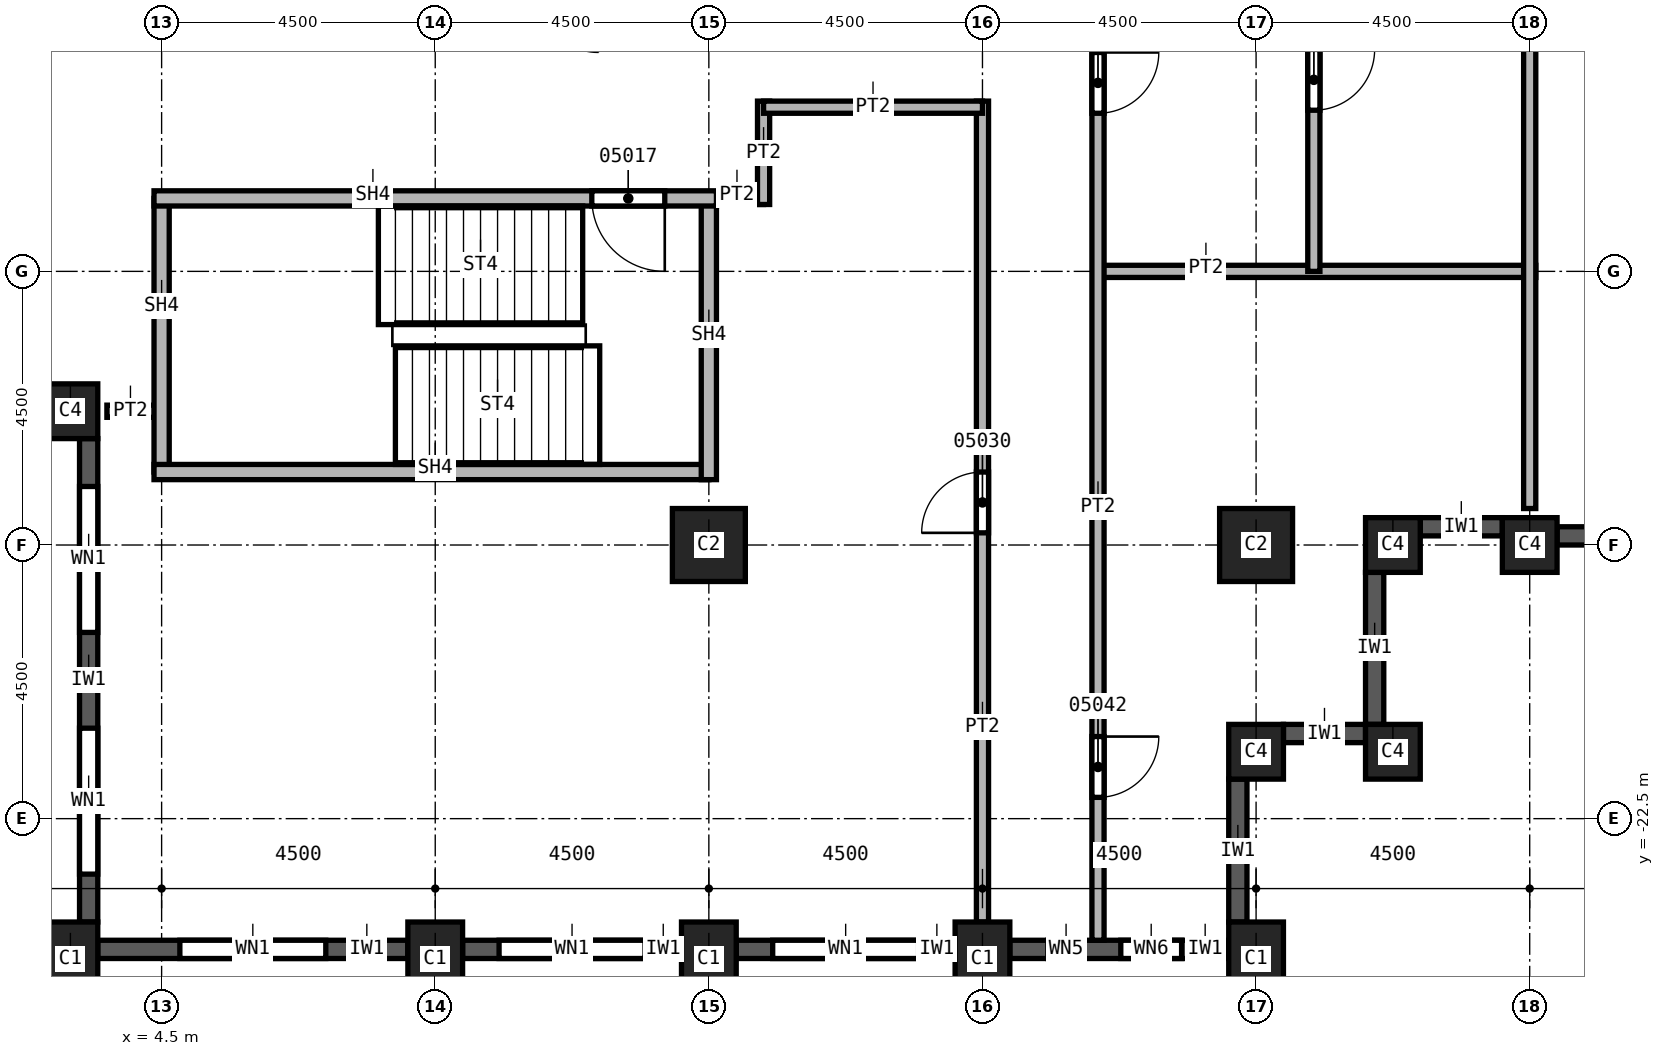
"""IFC4 building model, lengths in metres.
Left out: names, types, materials, properties, quantities, classifications, styles, units other than length and angle.
Written with IfcOpenShell. Run it as: python <this file> out.ifc"""

import sys

from ifc_helpers import new_model, si_unit, direction, frame, frame_2d, origin, origin_2d, place, context, subcontext, project, spatial, rectangle, extrude, element, fill, save


model = new_model("IFC4")
c1 = context("Model", 3, precision=1e-05, world=origin(), true_north=direction((0.0, 1.0)))
c2 = subcontext(c1, "Body", "Model", "MODEL_VIEW")
j1 = project(units=[si_unit("LENGTHUNIT", "METRE"), si_unit("PLANEANGLEUNIT", "RADIAN")], contexts=[c1])
p1 = place(None, origin())
s1 = spatial("IfcSite", under=j1, at=p1, CompositionType="ELEMENT")
p2 = place(p1, origin())
s2 = spatial("IfcBuilding", under=s1, at=p2, CompositionType="ELEMENT")
p3 = place(p2, frame((0.0, 0.0, 116.0)))
s3 = spatial("IfcBuildingStorey", under=s2, at=p3, CompositionType="ELEMENT", Elevation=116.0)
for number, where, z_axis, x_axis in (
    (1, (13.5, -18.0, 0.0), (0.0, 0.0, 1.0), (1.0, 0.0, 0.0)),
    (2, (22.5, -18.0, 0.0), (0.0, 0.0, 1.0), (1.0, 0.0, 0.0)),
):
    element("IfcColumn", number, at=place(p3, frame(where, z_axis=z_axis, x_axis=x_axis)), inside=s3, PredefinedType="COLUMN", context=c2, shape_type="SweptSolid", body=[
        extrude(rectangle(XDim=1.2, YDim=1.2, at=origin_2d()), origin(), (0.0, 0.0, 1.0), 3.6),
    ])
p4 = place(p3, frame((27.0, -18.0, 0.0), z_axis=(0.0, 0.0, 1.0), x_axis=(1.0, 0.0, 0.0)))
e3 = element("IfcColumn", 3, at=p4, inside=s3, PredefinedType="COLUMN", context=c2, shape_type="SweptSolid", body=[
    extrude(rectangle(XDim=0.9, YDim=0.9, at=origin_2d()), origin(), (0.0, 0.0, 1.0), 3.6),
])
for number, where, z_axis, x_axis in (
    (4, (3.0, -24.8, 0.0), (0.0, 0.0, 1.0), (1.0, 0.0, 0.0)),
    (5, (9.0, -24.8, 0.0), (0.0, 0.0, 1.0), (1.0, 0.0, 0.0)),
    (6, (13.5, -24.8, 0.0), (0.0, 0.0, 1.0), (1.0, 0.0, 0.0)),
    (7, (18.0, -24.8, 0.0), (0.0, 0.0, 1.0), (1.0, 0.0, 0.0)),
    (8, (22.5, -24.8, 0.0), (0.0, 0.0, 1.0), (1.0, 0.0, 0.0)),
):
    element("IfcColumn", number, at=place(p3, frame(where, z_axis=z_axis, x_axis=x_axis)), inside=s3, PredefinedType="COLUMN", context=c2, shape_type="SweptSolid", body=[
        extrude(rectangle(XDim=0.9, YDim=1.2, at=origin_2d()), origin(), (0.0, 0.0, 1.0), 3.6),
    ])
for number, where, z_axis, x_axis in (
    (9, (3.0, -15.8, 0.0), (0.0, 0.0, 1.0), (1.0, 0.0, 0.0)),
    (10, (22.5, -21.4, 0.0), (0.0, 0.0, 1.0), (1.0, 0.0, 0.0)),
    (11, (24.75, -21.4, 0.0), (0.0, 0.0, 1.0), (1.0, 0.0, 0.0)),
    (12, (24.75, -18.0, 0.0), (0.0, 0.0, 1.0), (1.0, 0.0, 0.0)),
):
    element("IfcColumn", number, at=place(p3, frame(where, z_axis=z_axis, x_axis=x_axis)), inside=s3, PredefinedType="COLUMN", context=c2, shape_type="SweptSolid", body=[
        extrude(rectangle(XDim=0.9, YDim=0.9, at=origin_2d()), origin(), (0.0, 0.0, 1.0), 3.6),
    ])
p5 = place(p3, frame((3.3, -16.25, 0.0), z_axis=(0.0, 0.0, 1.0), x_axis=(0.0, -1.0, 0.0)))
e13 = element("IfcWall", 13, at=p5, inside=s3, PredefinedType="SOLIDWALL", context=c2, shape_type="SweptSolid", body=[
    extrude(rectangle(XDim=7.95, YDim=0.3, at=frame_2d((3.975, 0.0))), origin(), (0.0, 0.0, 1.0), 3.0),
])
p6 = place(p5, frame((0.788, 0.0, 0.8)))
e14 = element("IfcOpeningElement", 14, at=p6, cuts=e13, PredefinedType="OPENING", context=c2, shape_type="SweptSolid", body=[
    extrude(rectangle(XDim=2.4, YDim=1.95, at=frame_2d((1.2, 0.975))), frame((0.0, 0.15, 0.0), z_axis=(0.0, -1.0, 0.0), x_axis=(1.0, 0.0, 0.0)), (0.0, 0.0, 1.0), 0.3),
])
p7 = place(p5, frame((4.762, 0.0, 0.8)))
e15 = element("IfcOpeningElement", 15, at=p7, cuts=e13, PredefinedType="OPENING", context=c2, shape_type="SweptSolid", body=[
    extrude(rectangle(XDim=2.4, YDim=1.95, at=frame_2d((1.2, 0.975))), frame((0.0, 0.15, 0.0), z_axis=(0.0, -1.0, 0.0), x_axis=(1.0, 0.0, 0.0)), (0.0, 0.0, 1.0), 0.3),
])
p8 = place(p3, frame((3.45, -24.65, 0.0), z_axis=(0.0, 0.0, 1.0), x_axis=(1.0, 0.0, 0.0)))
e16 = element("IfcWall", 16, at=p8, inside=s3, PredefinedType="SOLIDWALL", context=c2, shape_type="SweptSolid", body=[
    extrude(rectangle(XDim=5.1, YDim=0.3, at=frame_2d((2.55, 0.0))), origin(), (0.0, 0.0, 1.0), 3.0),
])
p9 = place(p8, frame((1.35, 0.0, 0.8)))
e17 = element("IfcOpeningElement", 17, at=p9, cuts=e16, PredefinedType="OPENING", context=c2, shape_type="SweptSolid", body=[
    extrude(rectangle(XDim=2.4, YDim=1.95, at=frame_2d((1.2, 0.975))), frame((0.0, 0.15, 0.0), z_axis=(0.0, -1.0, 0.0), x_axis=(1.0, 0.0, 0.0)), (0.0, 0.0, 1.0), 0.3),
])
p10 = place(p3, frame((9.45, -24.65, 0.0), z_axis=(0.0, 0.0, 1.0), x_axis=(1.0, 0.0, 0.0)))
e18 = element("IfcWall", 18, at=p10, inside=s3, PredefinedType="SOLIDWALL", context=c2, shape_type="SweptSolid", body=[
    extrude(rectangle(XDim=3.6, YDim=0.3, at=frame_2d((1.8, 0.0))), origin(), (0.0, 0.0, 1.0), 3.0),
])
p11 = place(p10, frame((0.6, 0.0, 0.8)))
e19 = element("IfcOpeningElement", 19, at=p11, cuts=e18, PredefinedType="OPENING", context=c2, shape_type="SweptSolid", body=[
    extrude(rectangle(XDim=2.4, YDim=1.95, at=frame_2d((1.2, 0.975))), frame((0.0, 0.15, 0.0), z_axis=(0.0, -1.0, 0.0), x_axis=(1.0, 0.0, 0.0)), (0.0, 0.0, 1.0), 0.3),
])
p12 = place(p3, frame((13.95, -24.65, 0.0), z_axis=(0.0, 0.0, 1.0), x_axis=(1.0, 0.0, 0.0)))
e20 = element("IfcWall", 20, at=p12, inside=s3, PredefinedType="SOLIDWALL", context=c2, shape_type="SweptSolid", body=[
    extrude(rectangle(XDim=3.6, YDim=0.3, at=frame_2d((1.8, 0.0))), origin(), (0.0, 0.0, 1.0), 3.0),
])
p13 = place(p12, frame((0.6, 0.0, 0.8)))
e21 = element("IfcOpeningElement", 21, at=p13, cuts=e20, PredefinedType="OPENING", context=c2, shape_type="SweptSolid", body=[
    extrude(rectangle(XDim=2.4, YDim=1.95, at=frame_2d((1.2, 0.975))), frame((0.0, 0.15, 0.0), z_axis=(0.0, -1.0, 0.0), x_axis=(1.0, 0.0, 0.0)), (0.0, 0.0, 1.0), 0.3),
])
p14 = place(p3, frame((18.45, -24.65, 0.0), z_axis=(0.0, 0.0, 1.0), x_axis=(1.0, 0.0, 0.0)))
e22 = element("IfcWall", 22, at=p14, inside=s3, PredefinedType="SOLIDWALL", context=c2, shape_type="SweptSolid", body=[
    extrude(rectangle(XDim=3.6, YDim=0.3, at=frame_2d((1.8, 0.0))), origin(), (0.0, 0.0, 1.0), 3.0),
])
p15 = place(p14, frame((0.625, 0.0, 0.8)))
e23 = element("IfcOpeningElement", 23, at=p15, cuts=e22, PredefinedType="OPENING", context=c2, shape_type="SweptSolid", body=[
    extrude(rectangle(XDim=0.6, YDim=1.95, at=frame_2d((0.3, 0.975))), frame((0.0, 0.15, 0.0), z_axis=(0.0, -1.0, 0.0), x_axis=(1.0, 0.0, 0.0)), (0.0, 0.0, 1.0), 0.3),
])
p16 = place(p14, frame((1.825, 0.0, 0.8)))
e24 = element("IfcOpeningElement", 24, at=p16, cuts=e22, PredefinedType="OPENING", context=c2, shape_type="SweptSolid", body=[
    extrude(rectangle(XDim=1.0, YDim=1.95, at=frame_2d((0.5, 0.975))), frame((0.0, 0.15, 0.0), z_axis=(0.0, -1.0, 0.0), x_axis=(1.0, 0.0, 0.0)), (0.0, 0.0, 1.0), 0.3),
])
p17 = place(p3, frame((22.2, -24.2, 0.0), z_axis=(0.0, 0.0, 1.0), x_axis=(0.0, 1.0, 0.0)))
e25 = element("IfcWall", 25, at=p17, inside=s3, PredefinedType="SOLIDWALL", context=c2, shape_type="SweptSolid", body=[
    extrude(rectangle(XDim=2.35, YDim=0.3, at=frame_2d((1.175, 0.0))), origin(), (0.0, 0.0, 1.0), 3.0),
])
p18 = place(p3, frame((22.95, -21.1, 0.0), z_axis=(0.0, 0.0, 1.0), x_axis=(1.0, 0.0, 0.0)))
e26 = element("IfcWall", 26, at=p18, inside=s3, PredefinedType="SOLIDWALL", context=c2, shape_type="SweptSolid", body=[
    extrude(rectangle(XDim=1.35, YDim=0.3, at=frame_2d((0.675, 0.0))), origin(), (0.0, 0.0, 1.0), 3.0),
])
p19 = place(p3, frame((24.45, -20.95, 0.0), z_axis=(0.0, 0.0, 1.0), x_axis=(0.0, 1.0, 0.0)))
e27 = element("IfcWall", 27, at=p19, inside=s3, PredefinedType="SOLIDWALL", context=c2, shape_type="SweptSolid", body=[
    extrude(rectangle(XDim=2.5, YDim=0.3, at=frame_2d((1.25, 0.0))), origin(), (0.0, 0.0, 1.0), 3.0),
])
p20 = place(p3, frame((25.2, -17.7, 0.0), z_axis=(0.0, 0.0, 1.0), x_axis=(1.0, 0.0, 0.0)))
e28 = element("IfcWall", 28, at=p20, inside=s3, PredefinedType="SOLIDWALL", context=c2, shape_type="SweptSolid", body=[
    extrude(rectangle(XDim=1.35, YDim=0.3, at=frame_2d((0.675, 0.0))), origin(), (0.0, 0.0, 1.0), 3.0),
])
p21 = place(p3, frame((27.45, -17.85, 0.0), z_axis=(0.0, 0.0, 1.0), x_axis=(1.0, 0.0, 0.0)))
e29 = element("IfcWall", 29, at=p21, inside=s3, PredefinedType="SOLIDWALL", context=c2, shape_type="SweptSolid", body=[
    extrude(rectangle(XDim=3.6, YDim=0.3, at=frame_2d((1.8, 0.0))), origin(), (0.0, 0.0, 1.0), 3.0),
])
p22 = place(p21, frame((0.6, 0.0, 0.8)))
e30 = element("IfcOpeningElement", 30, at=p22, cuts=e29, PredefinedType="OPENING", context=c2, shape_type="SweptSolid", body=[
    extrude(rectangle(XDim=2.4, YDim=1.95, at=frame_2d((1.2, 0.975))), frame((0.0, 0.15, 0.0), z_axis=(0.0, -1.0, 0.0), x_axis=(1.0, 0.0, 0.0)), (0.0, 0.0, 1.0), 0.3),
])
p23 = place(p3, frame((4.5, -15.8, 0.0), z_axis=(0.0, 0.0, 1.0), x_axis=(-1.0, 0.0, 0.0)))
e31 = element("IfcWall", 31, at=p23, inside=s3, PredefinedType="PARTITIONING", context=c2, shape_type="SweptSolid", body=[
    extrude(rectangle(XDim=0.9, YDim=0.2, at=frame_2d((0.45, 0.0))), origin(), (0.0, 0.0, 1.0), 3.6),
])
p24 = place(p3, frame((14.4, -12.3, 0.0), z_axis=(0.0, 0.0, 1.0), x_axis=(-1.0, 0.0, 0.0)))
e32 = element("IfcWall", 32, at=p24, inside=s3, PredefinedType="PARTITIONING", context=c2, shape_type="SweptSolid", body=[
    extrude(rectangle(XDim=1.025, YDim=0.2, at=frame_2d((0.512, 0.0))), origin(), (0.0, 0.0, 1.0), 3.6),
])
p25 = place(p3, frame((14.4, -10.7, 0.0), z_axis=(0.0, 0.0, 1.0), x_axis=(0.0, -1.0, 0.0)))
e33 = element("IfcWall", 33, at=p25, inside=s3, PredefinedType="PARTITIONING", context=c2, shape_type="SweptSolid", body=[
    extrude(rectangle(XDim=1.7, YDim=0.2, at=frame_2d((0.85, 0.0))), origin(), (0.0, 0.0, 1.0), 3.6),
])
p26 = place(p3, frame((18.0, -24.2, 0.0), z_axis=(0.0, 0.0, 1.0), x_axis=(0.0, 1.0, 0.0)))
e34 = element("IfcWall", 34, at=p26, inside=s3, PredefinedType="PARTITIONING", context=c2, shape_type="SweptSolid", body=[
    extrude(rectangle(XDim=13.5, YDim=0.2, at=frame_2d((6.75, 0.0))), origin(), (0.0, 0.0, 1.0), 3.6),
])
p27 = place(p26, frame((6.4, 0.0, 0.0)))
e35 = element("IfcOpeningElement", 35, at=p27, cuts=e34, PredefinedType="OPENING", context=c2, shape_type="SweptSolid", body=[
    extrude(rectangle(XDim=1.0, YDim=2.1, at=frame_2d((0.5, 1.05))), frame((0.0, 0.1, 0.0), z_axis=(0.0, -1.0, 0.0), x_axis=(1.0, 0.0, 0.0)), (0.0, 0.0, 1.0), 0.2),
])
p28 = place(p3, frame((18.0, -10.8, 0.0), z_axis=(0.0, 0.0, 1.0), x_axis=(-1.0, 0.0, 0.0)))
e36 = element("IfcWall", 36, at=p28, inside=s3, PredefinedType="PARTITIONING", context=c2, shape_type="SweptSolid", body=[
    extrude(rectangle(XDim=3.6, YDim=0.2, at=frame_2d((1.8, 0.0))), origin(), (0.0, 0.0, 1.0), 3.6),
])
p29 = place(p3, frame((19.9, -13.5, 0.0), z_axis=(0.0, 0.0, 1.0), x_axis=(1.0, 0.0, 0.0)))
e37 = element("IfcWall", 37, at=p29, inside=s3, PredefinedType="PARTITIONING", context=c2, shape_type="SweptSolid", body=[
    extrude(rectangle(XDim=7.2, YDim=0.2, at=frame_2d((3.6, 0.0))), origin(), (0.0, 0.0, 1.0), 3.6),
])
p30 = place(p3, frame((19.9, -3.65, 0.0), z_axis=(0.0, 0.0, 1.0), x_axis=(0.0, -1.0, 0.0)))
e38 = element("IfcWall", 38, at=p30, inside=s3, PredefinedType="PARTITIONING", context=c2, shape_type="SweptSolid", body=[
    extrude(rectangle(XDim=20.85, YDim=0.2, at=frame_2d((10.425, 0.0))), origin(), (0.0, 0.0, 1.0), 3.6),
])
p31 = place(p30, frame((17.5, 0.0, 0.0)))
e39 = element("IfcOpeningElement", 39, at=p31, cuts=e38, PredefinedType="OPENING", context=c2, shape_type="SweptSolid", body=[
    extrude(rectangle(XDim=1.0, YDim=2.1, at=frame_2d((0.5, 1.05))), frame((0.0, 0.1, 0.0), z_axis=(0.0, -1.0, 0.0), x_axis=(1.0, 0.0, 0.0)), (0.0, 0.0, 1.0), 0.2),
])
p32 = place(p30, frame((6.25, 0.0, 0.0)))
e40 = element("IfcOpeningElement", 40, at=p32, cuts=e38, PredefinedType="OPENING", context=c2, shape_type="SweptSolid", body=[
    extrude(rectangle(XDim=1.0, YDim=2.1, at=frame_2d((0.5, 1.05))), frame((0.0, 0.1, 0.0), z_axis=(0.0, -1.0, 0.0), x_axis=(1.0, 0.0, 0.0)), (0.0, 0.0, 1.0), 0.2),
])
p33 = place(p3, frame((23.45, -3.75, 0.0), z_axis=(0.0, 0.0, 1.0), x_axis=(0.0, -1.0, 0.0)))
e41 = element("IfcWall", 41, at=p33, inside=s3, PredefinedType="PARTITIONING", context=c2, shape_type="SweptSolid", body=[
    extrude(rectangle(XDim=9.75, YDim=0.2, at=frame_2d((4.875, 0.0))), origin(), (0.0, 0.0, 1.0), 3.6),
])
p34 = place(p33, frame((6.1, 0.0, 0.0)))
e42 = element("IfcOpeningElement", 42, at=p34, cuts=e41, PredefinedType="OPENING", context=c2, shape_type="SweptSolid", body=[
    extrude(rectangle(XDim=1.0, YDim=2.1, at=frame_2d((0.5, 1.05))), frame((0.0, 0.1, 0.0), z_axis=(0.0, -1.0, 0.0), x_axis=(1.0, 0.0, 0.0)), (0.0, 0.0, 1.0), 0.2),
])
p35 = place(p3, frame((27.0, -3.75, 0.0), z_axis=(0.0, 0.0, 1.0), x_axis=(0.0, -1.0, 0.0)))
e43 = element("IfcWall", 43, at=p35, inside=s3, PredefinedType="PARTITIONING", context=c2, shape_type="SweptSolid", body=[
    extrude(rectangle(XDim=13.65, YDim=0.2, at=frame_2d((6.825, 0.0))), origin(), (0.0, 0.0, 1.0), 3.6),
])
p36 = place(p3, frame((4.5, -16.8, 0.0), z_axis=(0.0, 0.0, 1.0), x_axis=(0.0, 1.0, 0.0)))
e44 = element("IfcWall", 44, at=p36, inside=s3, PredefinedType="SOLIDWALL", context=c2, shape_type="SweptSolid", body=[
    extrude(rectangle(XDim=4.5, YDim=0.25, at=frame_2d((2.25, 0.0))), origin(), (0.0, 0.0, 1.0), 3.6),
])
p37 = place(p3, frame((13.5, -16.8, 0.0), z_axis=(0.0, 0.0, 1.0), x_axis=(-1.0, 0.0, 0.0)))
e45 = element("IfcWall", 45, at=p37, inside=s3, PredefinedType="SOLIDWALL", context=c2, shape_type="SweptSolid", body=[
    extrude(rectangle(XDim=9.125, YDim=0.25, at=frame_2d((4.562, 0.0))), origin(), (0.0, 0.0, 1.0), 3.6),
])
p38 = place(p3, frame((13.5, -12.3, 0.0), z_axis=(0.0, 0.0, 1.0), x_axis=(0.0, -1.0, 0.0)))
e46 = element("IfcWall", 46, at=p38, inside=s3, PredefinedType="SOLIDWALL", context=c2, shape_type="SweptSolid", body=[
    extrude(rectangle(XDim=4.625, YDim=0.25, at=frame_2d((2.312, 0.0))), origin(), (0.0, 0.0, 1.0), 3.6),
])
p39 = place(p3, frame((13.625, -12.3, 0.0), z_axis=(0.0, 0.0, 1.0), x_axis=(-1.0, 0.0, 0.0)))
e47 = element("IfcWall", 47, at=p39, inside=s3, PredefinedType="SOLIDWALL", context=c2, shape_type="SweptSolid", body=[
    extrude(rectangle(XDim=9.25, YDim=0.25, at=frame_2d((4.625, 0.0))), origin(), (0.0, 0.0, 1.0), 3.6),
])
p40 = place(p39, frame((0.85, 0.0, 0.0)))
e48 = element("IfcOpeningElement", 48, at=p40, cuts=e47, PredefinedType="OPENING", context=c2, shape_type="SweptSolid", body=[
    extrude(rectangle(XDim=1.2, YDim=2.1, at=frame_2d((0.6, 1.05))), frame((0.0, 0.125, 0.0), z_axis=(0.0, -1.0, 0.0), x_axis=(1.0, 0.0, 0.0)), (0.0, 0.0, 1.0), 0.25),
])
p41 = place(p6, origin())
e49 = element("IfcWindow", 49, at=p41, inside=s3, PartitioningType="SINGLE_PANEL", PredefinedType="WINDOW", context=c2, shape_type="SweptSolid", body=[
    extrude(rectangle(XDim=2.4, YDim=1.95, at=frame_2d((1.2, 0.975))), frame((0.0, 0.03, 0.0), z_axis=(0.0, -1.0, 0.0), x_axis=(1.0, 0.0, 0.0)), (0.0, 0.0, 1.0), 0.06),
])
fill(e14, e49)
p42 = place(p7, origin())
e50 = element("IfcWindow", 50, at=p42, inside=s3, PartitioningType="SINGLE_PANEL", PredefinedType="WINDOW", context=c2, shape_type="SweptSolid", body=[
    extrude(rectangle(XDim=2.4, YDim=1.95, at=frame_2d((1.2, 0.975))), frame((0.0, 0.03, 0.0), z_axis=(0.0, -1.0, 0.0), x_axis=(1.0, 0.0, 0.0)), (0.0, 0.0, 1.0), 0.06),
])
fill(e15, e50)
p43 = place(p9, origin())
e51 = element("IfcWindow", 51, at=p43, inside=s3, PartitioningType="SINGLE_PANEL", PredefinedType="WINDOW", context=c2, shape_type="SweptSolid", body=[
    extrude(rectangle(XDim=2.4, YDim=1.95, at=frame_2d((1.2, 0.975))), frame((0.0, 0.03, 0.0), z_axis=(0.0, -1.0, 0.0), x_axis=(1.0, 0.0, 0.0)), (0.0, 0.0, 1.0), 0.06),
])
fill(e17, e51)
p44 = place(p11, origin())
e52 = element("IfcWindow", 52, at=p44, inside=s3, PartitioningType="SINGLE_PANEL", PredefinedType="WINDOW", context=c2, shape_type="SweptSolid", body=[
    extrude(rectangle(XDim=2.4, YDim=1.95, at=frame_2d((1.2, 0.975))), frame((0.0, 0.03, 0.0), z_axis=(0.0, -1.0, 0.0), x_axis=(1.0, 0.0, 0.0)), (0.0, 0.0, 1.0), 0.06),
])
fill(e19, e52)
p45 = place(p13, origin())
e53 = element("IfcWindow", 53, at=p45, inside=s3, PartitioningType="SINGLE_PANEL", PredefinedType="WINDOW", context=c2, shape_type="SweptSolid", body=[
    extrude(rectangle(XDim=2.4, YDim=1.95, at=frame_2d((1.2, 0.975))), frame((0.0, 0.03, 0.0), z_axis=(0.0, -1.0, 0.0), x_axis=(1.0, 0.0, 0.0)), (0.0, 0.0, 1.0), 0.06),
])
fill(e21, e53)
p46 = place(p40, origin())
e54 = element("IfcDoor", 54, at=p46, inside=s3, OperationType="SINGLE_SWING_RIGHT", PredefinedType="DOOR", context=c2, shape_type="SweptSolid", body=[
    extrude(rectangle(XDim=1.2, YDim=2.1, at=frame_2d((0.6, 1.05))), frame((0.0, 0.025, 0.0), z_axis=(0.0, -1.0, 0.0), x_axis=(1.0, 0.0, 0.0)), (0.0, 0.0, 1.0), 0.05),
])
fill(e48, e54)
p47 = place(p27, origin())
e55 = element("IfcDoor", 55, at=p47, inside=s3, OperationType="SINGLE_SWING_LEFT", PredefinedType="DOOR", context=c2, shape_type="SweptSolid", body=[
    extrude(rectangle(XDim=1.0, YDim=2.1, at=frame_2d((0.5, 1.05))), frame((0.0, 0.025, 0.0), z_axis=(0.0, -1.0, 0.0), x_axis=(1.0, 0.0, 0.0)), (0.0, 0.0, 1.0), 0.05),
])
fill(e35, e55)
p48 = place(p31, origin())
e56 = element("IfcDoor", 56, at=p48, inside=s3, OperationType="SINGLE_SWING_LEFT", PredefinedType="DOOR", context=c2, shape_type="SweptSolid", body=[
    extrude(rectangle(XDim=1.0, YDim=2.1, at=frame_2d((0.5, 1.05))), frame((0.0, 0.025, 0.0), z_axis=(0.0, -1.0, 0.0), x_axis=(1.0, 0.0, 0.0)), (0.0, 0.0, 1.0), 0.05),
])
fill(e39, e56)
p49 = place(p32, origin())
e57 = element("IfcDoor", 57, at=p49, inside=s3, OperationType="SINGLE_SWING_RIGHT", PredefinedType="DOOR", context=c2, shape_type="SweptSolid", body=[
    extrude(rectangle(XDim=1.0, YDim=2.1, at=frame_2d((0.5, 1.05))), frame((0.0, 0.025, 0.0), z_axis=(0.0, -1.0, 0.0), x_axis=(1.0, 0.0, 0.0)), (0.0, 0.0, 1.0), 0.05),
])
fill(e40, e57)
p50 = place(p34, origin())
e58 = element("IfcDoor", 58, at=p50, inside=s3, OperationType="SINGLE_SWING_LEFT", PredefinedType="DOOR", context=c2, shape_type="SweptSolid", body=[
    extrude(rectangle(XDim=1.0, YDim=2.1, at=frame_2d((0.5, 1.05))), frame((0.0, 0.025, 0.0), z_axis=(0.0, -1.0, 0.0), x_axis=(1.0, 0.0, 0.0)), (0.0, 0.0, 1.0), 0.05),
])
fill(e42, e58)
p51 = place(p15, origin())
e59 = element("IfcWindow", 59, at=p51, inside=s3, PartitioningType="SINGLE_PANEL", PredefinedType="WINDOW", context=c2, shape_type="SweptSolid", body=[
    extrude(rectangle(XDim=0.6, YDim=1.95, at=frame_2d((0.3, 0.975))), frame((0.0, 0.03, 0.0), z_axis=(0.0, -1.0, 0.0), x_axis=(1.0, 0.0, 0.0)), (0.0, 0.0, 1.0), 0.06),
])
fill(e23, e59)
p52 = place(p16, origin())
e60 = element("IfcWindow", 60, at=p52, inside=s3, PartitioningType="SINGLE_PANEL", PredefinedType="WINDOW", context=c2, shape_type="SweptSolid", body=[
    extrude(rectangle(XDim=1.0, YDim=1.95, at=frame_2d((0.5, 0.975))), frame((0.0, 0.03, 0.0), z_axis=(0.0, -1.0, 0.0), x_axis=(1.0, 0.0, 0.0)), (0.0, 0.0, 1.0), 0.06),
])
fill(e24, e60)
save(model, sys.argv[1])
